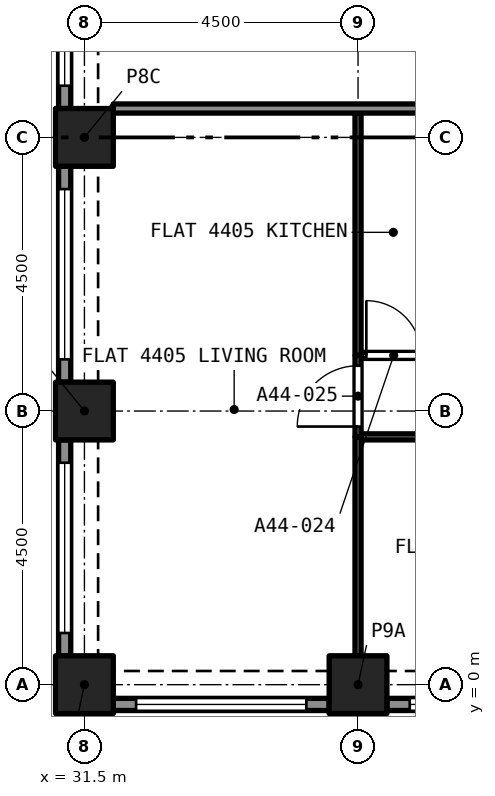
"""IFC4 building model, lengths in metres.
Left out: names, types, materials, properties, quantities, classifications, styles, units other than length and angle.
Written with IfcOpenShell. Run it as: python <this file> out.ifc"""

import sys

from ifc_helpers import new_model, si_unit, direction, frame, frame_2d, origin, origin_2d, place, context, subcontext, project, spatial, rectangle, extrude, element, fill, save


model = new_model("IFC4")
c1 = context("Model", 3, precision=1e-05, world=origin(), true_north=direction((0.0, 1.0)))
c2 = subcontext(c1, "Body", "Model", "MODEL_VIEW")
j1 = project(units=[si_unit("LENGTHUNIT", "METRE"), si_unit("PLANEANGLEUNIT", "RADIAN")], contexts=[c1])
p1 = place(None, origin())
s1 = spatial("IfcSite", under=j1, at=p1, CompositionType="ELEMENT")
p2 = place(p1, origin())
s2 = spatial("IfcBuilding", under=s1, at=p2, CompositionType="ELEMENT")
p3 = place(p2, frame((0.0, 0.0, 159.4)))
s3 = spatial("IfcBuildingStorey", under=s2, at=p3, CompositionType="ELEMENT", Elevation=159.4)
for number, where, z_axis, x_axis in (
    (1, (31.5, 0.0, 0.0), (0.0, 0.0, 1.0), (1.0, 0.0, 0.0)),
    (2, (36.0, 0.0, 0.0), (0.0, 0.0, 1.0), (1.0, 0.0, 0.0)),
    (3, (31.5, 4.5, 0.0), (0.0, 0.0, 1.0), (1.0, 0.0, 0.0)),
    (4, (31.5, 9.0, 0.0), (0.0, 0.0, 1.0), (1.0, 0.0, 0.0)),
):
    element("IfcColumn", number, at=place(p3, frame(where, z_axis=z_axis, x_axis=x_axis)), inside=s3, PredefinedType="COLUMN", context=c2, shape_type="SweptSolid", body=[
        extrude(rectangle(XDim=0.95, YDim=0.95, at=origin_2d()), origin(), (0.0, 0.0, 1.0), 4.4),
    ])
p4 = place(p3, frame((35.525, -0.325, 0.0), z_axis=(0.0, 0.0, 1.0), x_axis=(-1.0, 0.0, 0.0)))
e5 = element("IfcWall", 5, at=p4, inside=s3, PredefinedType="SOLIDWALL", context=c2, shape_type="SweptSolid", body=[
    extrude(rectangle(XDim=3.55, YDim=0.2, at=frame_2d((1.775, 0.0))), origin(), (0.0, 0.0, 1.0), 4.4),
])
p5 = place(p4, frame((0.375, 0.0, 0.45)))
e6 = element("IfcOpeningElement", 6, at=p5, cuts=e5, PredefinedType="OPENING", context=c2, shape_type="SweptSolid", body=[
    extrude(rectangle(XDim=2.8, YDim=2.55, at=frame_2d((1.4, 1.275))), frame((0.0, 0.11, 0.0), z_axis=(0.0, -1.0, 0.0), x_axis=(1.0, 0.0, 0.0)), (0.0, 0.0, 1.0), 0.22),
])
p6 = place(p3, frame((40.025, -0.325, 0.0), z_axis=(0.0, 0.0, 1.0), x_axis=(-1.0, 0.0, 0.0)))
e7 = element("IfcWall", 7, at=p6, inside=s3, PredefinedType="SOLIDWALL", context=c2, shape_type="SweptSolid", body=[
    extrude(rectangle(XDim=3.55, YDim=0.2, at=frame_2d((1.775, 0.0))), origin(), (0.0, 0.0, 1.0), 4.4),
])
p7 = place(p6, frame((0.375, 0.0, 0.45)))
e8 = element("IfcOpeningElement", 8, at=p7, cuts=e7, PredefinedType="OPENING", context=c2, shape_type="SweptSolid", body=[
    extrude(rectangle(XDim=2.8, YDim=2.55, at=frame_2d((1.4, 1.275))), frame((0.0, 0.11, 0.0), z_axis=(0.0, -1.0, 0.0), x_axis=(1.0, 0.0, 0.0)), (0.0, 0.0, 1.0), 0.22),
])
p8 = place(p3, frame((31.175, 9.475, 0.0), z_axis=(0.0, 0.0, 1.0), x_axis=(0.0, 1.0, 0.0)))
e9 = element("IfcWall", 9, at=p8, inside=s3, PredefinedType="SOLIDWALL", context=c2, shape_type="SweptSolid", body=[
    extrude(rectangle(XDim=3.55, YDim=0.2, at=frame_2d((1.775, 0.0))), origin(), (0.0, 0.0, 1.0), 4.4),
])
p9 = place(p8, frame((0.375, 0.0, 0.45)))
e10 = element("IfcOpeningElement", 10, at=p9, cuts=e9, PredefinedType="OPENING", context=c2, shape_type="SweptSolid", body=[
    extrude(rectangle(XDim=2.8, YDim=2.55, at=frame_2d((1.4, 1.275))), frame((0.0, 0.11, 0.0), z_axis=(0.0, -1.0, 0.0), x_axis=(1.0, 0.0, 0.0)), (0.0, 0.0, 1.0), 0.22),
])
p10 = place(p3, frame((31.175, 4.975, 0.0), z_axis=(0.0, 0.0, 1.0), x_axis=(0.0, 1.0, 0.0)))
e11 = element("IfcWall", 11, at=p10, inside=s3, PredefinedType="SOLIDWALL", context=c2, shape_type="SweptSolid", body=[
    extrude(rectangle(XDim=3.55, YDim=0.2, at=frame_2d((1.775, 0.0))), origin(), (0.0, 0.0, 1.0), 4.4),
])
p11 = place(p10, frame((0.375, 0.0, 0.45)))
e12 = element("IfcOpeningElement", 12, at=p11, cuts=e11, PredefinedType="OPENING", context=c2, shape_type="SweptSolid", body=[
    extrude(rectangle(XDim=2.8, YDim=2.55, at=frame_2d((1.4, 1.275))), frame((0.0, 0.11, 0.0), z_axis=(0.0, -1.0, 0.0), x_axis=(1.0, 0.0, 0.0)), (0.0, 0.0, 1.0), 0.22),
])
p12 = place(p3, frame((31.175, 0.475, 0.0), z_axis=(0.0, 0.0, 1.0), x_axis=(0.0, 1.0, 0.0)))
e13 = element("IfcWall", 13, at=p12, inside=s3, PredefinedType="SOLIDWALL", context=c2, shape_type="SweptSolid", body=[
    extrude(rectangle(XDim=3.55, YDim=0.2, at=frame_2d((1.775, 0.0))), origin(), (0.0, 0.0, 1.0), 4.4),
])
p13 = place(p12, frame((0.375, 0.0, 0.45)))
e14 = element("IfcOpeningElement", 14, at=p13, cuts=e13, PredefinedType="OPENING", context=c2, shape_type="SweptSolid", body=[
    extrude(rectangle(XDim=2.8, YDim=2.55, at=frame_2d((1.4, 1.275))), frame((0.0, 0.11, 0.0), z_axis=(0.0, -1.0, 0.0), x_axis=(1.0, 0.0, 0.0)), (0.0, 0.0, 1.0), 0.22),
])
p14 = place(p3, frame((40.4, 4.075, 0.0), z_axis=(0.0, 0.0, 1.0), x_axis=(-1.0, 0.0, 0.0)))
e15 = element("IfcWall", 15, at=p14, inside=s3, PredefinedType="PARTITIONING", context=c2, shape_type="SweptSolid", body=[
    extrude(rectangle(XDim=4.35, YDim=0.1, at=frame_2d((2.175, 0.0))), origin(), (0.0, 0.0, 1.0), 4.1),
])
p15 = place(p14, frame((1.7, 0.0, 0.0)))
e16 = element("IfcOpeningElement", 16, at=p15, cuts=e15, PredefinedType="OPENING", context=c2, shape_type="SweptSolid", body=[
    extrude(rectangle(XDim=0.9, YDim=2.1, at=frame_2d((0.45, 1.05))), frame((0.0, 0.06, 0.0), z_axis=(0.0, -1.0, 0.0), x_axis=(1.0, 0.0, 0.0)), (0.0, 0.0, 1.0), 0.12),
])
p16 = place(p3, frame((36.0, 0.475, 0.0), z_axis=(0.0, 0.0, 1.0), x_axis=(0.0, 1.0, 0.0)))
e17 = element("IfcWall", 17, at=p16, inside=s3, PredefinedType="PARTITIONING", context=c2, shape_type="SweptSolid", body=[
    extrude(rectangle(XDim=3.6, YDim=0.1, at=frame_2d((1.8, 0.0))), origin(), (0.0, 0.0, 1.0), 4.1),
])
p17 = place(p3, frame((36.05, 5.415, 0.0), z_axis=(0.0, 0.0, 1.0), x_axis=(1.0, 0.0, 0.0)))
e18 = element("IfcWall", 18, at=p17, inside=s3, PredefinedType="PARTITIONING", context=c2, shape_type="SweptSolid", body=[
    extrude(rectangle(XDim=1.123, YDim=0.1, at=frame_2d((0.561, 0.0))), origin(), (0.0, 0.0, 1.0), 4.1),
])
p18 = place(p17, frame((0.086, 0.0, 0.0)))
e19 = element("IfcOpeningElement", 19, at=p18, cuts=e18, PredefinedType="OPENING", context=c2, shape_type="SweptSolid", body=[
    extrude(rectangle(XDim=0.9, YDim=2.1, at=frame_2d((0.45, 1.05))), frame((0.0, 0.06, 0.0), z_axis=(0.0, -1.0, 0.0), x_axis=(1.0, 0.0, 0.0)), (0.0, 0.0, 1.0), 0.12),
])
p19 = place(p3, frame((36.0, 4.075, 0.0), z_axis=(0.0, 0.0, 1.0), x_axis=(0.0, 1.0, 0.0)))
e20 = element("IfcWall", 20, at=p19, inside=s3, PredefinedType="PARTITIONING", context=c2, shape_type="SweptSolid", body=[
    extrude(rectangle(XDim=1.34, YDim=0.1, at=frame_2d((0.67, 0.0))), origin(), (0.0, 0.0, 1.0), 4.1),
])
p20 = place(p19, frame((0.17, 0.0, 0.0)))
e21 = element("IfcOpeningElement", 21, at=p20, cuts=e20, PredefinedType="OPENING", context=c2, shape_type="SweptSolid", body=[
    extrude(rectangle(XDim=1.0, YDim=2.1, at=frame_2d((0.5, 1.05))), frame((0.0, 0.06, 0.0), z_axis=(0.0, -1.0, 0.0), x_axis=(1.0, 0.0, 0.0)), (0.0, 0.0, 1.0), 0.12),
])
p21 = place(p3, frame((36.0, 5.415, 0.0), z_axis=(0.0, 0.0, 1.0), x_axis=(0.0, 1.0, 0.0)))
e22 = element("IfcWall", 22, at=p21, inside=s3, PredefinedType="PARTITIONING", context=c2, shape_type="SweptSolid", body=[
    extrude(rectangle(XDim=3.985, YDim=0.1, at=frame_2d((1.992, 0.0))), origin(), (0.0, 0.0, 1.0), 4.1),
])
p22 = place(p3, frame((31.975, 9.475, 0.0), z_axis=(0.0, 0.0, 1.0), x_axis=(1.0, 0.0, 0.0)))
e23 = element("IfcWall", 23, at=p22, inside=s3, PredefinedType="PARTITIONING", context=c2, shape_type="SweptSolid", body=[
    extrude(rectangle(XDim=6.175, YDim=0.15, at=frame_2d((3.087, 0.0))), origin(), (0.0, 0.0, 1.0), 4.1),
])
p23 = place(p5, origin())
e24 = element("IfcWindow", 24, at=p23, inside=s3, PartitioningType="SINGLE_PANEL", PredefinedType="WINDOW", context=c2, shape_type="SweptSolid", body=[
    extrude(rectangle(XDim=2.8, YDim=2.55, at=frame_2d((1.4, 1.275))), frame((0.0, 0.03, 0.0), z_axis=(0.0, -1.0, 0.0), x_axis=(1.0, 0.0, 0.0)), (0.0, 0.0, 1.0), 0.06),
])
fill(e6, e24)
p24 = place(p7, origin())
e25 = element("IfcWindow", 25, at=p24, inside=s3, PartitioningType="SINGLE_PANEL", PredefinedType="WINDOW", context=c2, shape_type="SweptSolid", body=[
    extrude(rectangle(XDim=2.8, YDim=2.55, at=frame_2d((1.4, 1.275))), frame((0.0, 0.03, 0.0), z_axis=(0.0, -1.0, 0.0), x_axis=(1.0, 0.0, 0.0)), (0.0, 0.0, 1.0), 0.06),
])
fill(e8, e25)
p25 = place(p9, origin())
e26 = element("IfcWindow", 26, at=p25, inside=s3, PartitioningType="SINGLE_PANEL", PredefinedType="WINDOW", context=c2, shape_type="SweptSolid", body=[
    extrude(rectangle(XDim=2.8, YDim=2.55, at=frame_2d((1.4, 1.275))), frame((0.0, 0.03, 0.0), z_axis=(0.0, -1.0, 0.0), x_axis=(1.0, 0.0, 0.0)), (0.0, 0.0, 1.0), 0.06),
])
fill(e10, e26)
p26 = place(p11, origin())
e27 = element("IfcWindow", 27, at=p26, inside=s3, PartitioningType="SINGLE_PANEL", PredefinedType="WINDOW", context=c2, shape_type="SweptSolid", body=[
    extrude(rectangle(XDim=2.8, YDim=2.55, at=frame_2d((1.4, 1.275))), frame((0.0, 0.03, 0.0), z_axis=(0.0, -1.0, 0.0), x_axis=(1.0, 0.0, 0.0)), (0.0, 0.0, 1.0), 0.06),
])
fill(e12, e27)
p27 = place(p13, origin())
e28 = element("IfcWindow", 28, at=p27, inside=s3, PartitioningType="SINGLE_PANEL", PredefinedType="WINDOW", context=c2, shape_type="SweptSolid", body=[
    extrude(rectangle(XDim=2.8, YDim=2.55, at=frame_2d((1.4, 1.275))), frame((0.0, 0.03, 0.0), z_axis=(0.0, -1.0, 0.0), x_axis=(1.0, 0.0, 0.0)), (0.0, 0.0, 1.0), 0.06),
])
fill(e14, e28)
p28 = place(p18, origin())
e29 = element("IfcDoor", 29, at=p28, inside=s3, OperationType="SINGLE_SWING_LEFT", PredefinedType="DOOR", context=c2, shape_type="SweptSolid", body=[
    extrude(rectangle(XDim=0.9, YDim=2.1, at=frame_2d((0.45, 1.05))), frame((0.0, 0.025, 0.0), z_axis=(0.0, -1.0, 0.0), x_axis=(1.0, 0.0, 0.0)), (0.0, 0.0, 1.0), 0.05),
])
fill(e19, e29)
p29 = place(p20, origin())
e30 = element("IfcDoor", 30, at=p29, inside=s3, OperationType="SINGLE_SWING_RIGHT", PredefinedType="DOOR", context=c2, shape_type="SweptSolid", body=[
    extrude(rectangle(XDim=1.0, YDim=2.1, at=frame_2d((0.5, 1.05))), frame((0.0, 0.025, 0.0), z_axis=(0.0, -1.0, 0.0), x_axis=(1.0, 0.0, 0.0)), (0.0, 0.0, 1.0), 0.05),
])
fill(e21, e30)
save(model, sys.argv[1])
